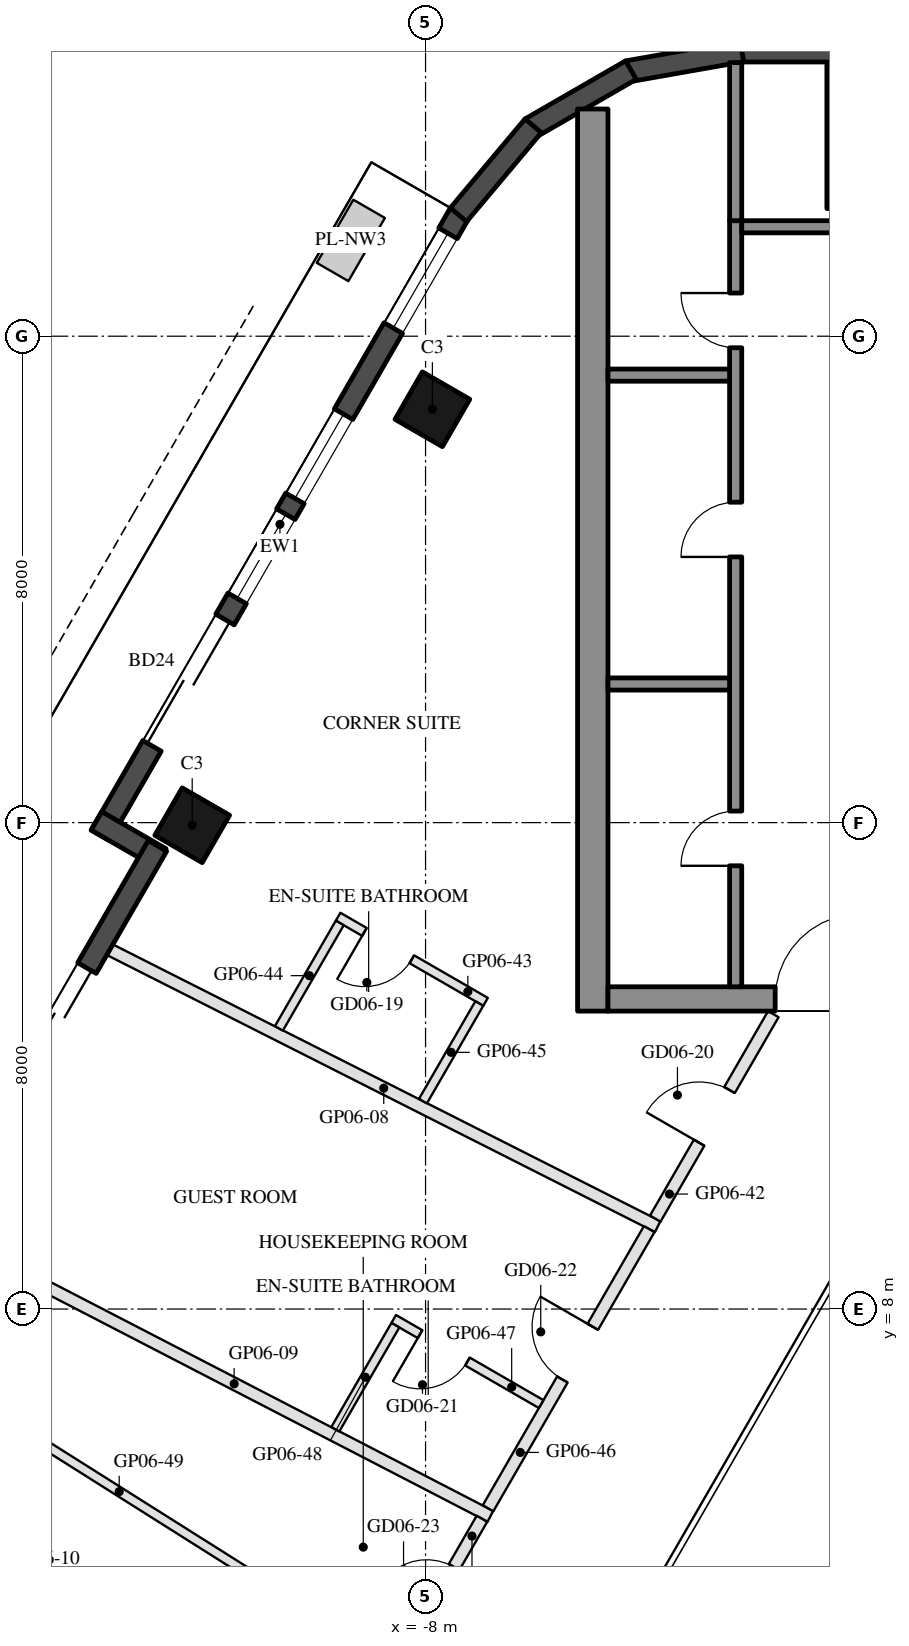
"""IFC4 building model, lengths in metres.
Left out: names, types, materials, properties, quantities, classifications, styles, units other than length and angle.
Written with IfcOpenShell. Run it as: python <this file> out.ifc"""

import sys

from ifc_helpers import new_model, si_unit, direction, frame, frame_2d, origin, origin_2d, place, context, subcontext, project, spatial, rectangle, hollow_rectangle, extrude, element, fill, save


model = new_model("IFC4")
c1 = context("Model", 3, precision=1e-05, world=origin(), true_north=direction((0.0, 1.0)))
c2 = subcontext(c1, "Body", "Model", "MODEL_VIEW")
j1 = project(units=[si_unit("LENGTHUNIT", "METRE"), si_unit("PLANEANGLEUNIT", "RADIAN")], contexts=[c1])
p1 = place(None, origin())
s1 = spatial("IfcSite", under=j1, at=p1, CompositionType="ELEMENT")
p2 = place(p1, origin())
s2 = spatial("IfcBuilding", under=s1, at=p2, CompositionType="ELEMENT")
p3 = place(p2, frame((0.0, 0.0, 90.9)))
s3 = spatial("IfcBuildingStorey", under=s2, at=p3, CompositionType="ELEMENT", Elevation=90.9)
for number, where, z_axis, x_axis in (
    (1, (-7.888, 22.798, 0.0), (0.0, 0.0, 1.0), (0.5, 0.866, 0.0)),
    (2, (-11.838, 15.957, 0.0), (0.0, 0.0, 1.0), (0.5, 0.866, 0.0)),
):
    element("IfcColumn", number, at=place(p3, frame(where, z_axis=z_axis, x_axis=x_axis)), inside=s3, PredefinedType="COLUMN", context=c2, shape_type="SweptSolid", body=[
        extrude(hollow_rectangle(XDim=0.9, YDim=0.9, WallThickness=0.04, at=origin_2d()), origin(), (0.0, 0.0, 1.0), 3.7),
    ])
p4 = place(p3, frame((0.0, 27.3, 0.0), z_axis=(0.0, 0.0, 1.0), x_axis=(1.0, 0.0, 0.0)))
e3 = element("IfcColumn", 3, at=p4, inside=s3, PredefinedType="COLUMN", context=c2, shape_type="SweptSolid", body=[
    extrude(hollow_rectangle(XDim=2.8, YDim=2.4, WallThickness=0.07, at=origin_2d()), origin(), (0.0, 0.0, 1.0), 3.7),
])
p5 = place(p3, frame((-7.441, 26.022, 0.0), z_axis=(0.0, 0.0, 1.0), x_axis=(-0.499992533062, -0.86602971478, 0.0)))
e4 = element("IfcWall", 4, at=p5, inside=s3, PredefinedType="SOLIDWALL", context=c2, shape_type="SweptSolid", body=[
    extrude(rectangle(XDim=11.816, YDim=0.35, at=frame_2d((5.908, 0.0))), origin(), (0.0, 0.0, 1.0), 3.55),
])
p6 = place(p5, frame((0.381, 0.0, 0.3)))
e5 = element("IfcOpeningElement", 5, at=p6, cuts=e4, PredefinedType="OPENING", context=c2, shape_type="SweptSolid", body=[
    extrude(rectangle(XDim=1.8, YDim=2.65, at=frame_2d((0.9, 1.325))), frame((0.0, 0.185, 0.0), z_axis=(0.0, -1.0, 0.0), x_axis=(1.0, 0.0, 0.0)), (0.0, 0.0, 1.0), 0.37),
])
p7 = place(p5, frame((7.716, 0.0, 0.0)))
e6 = element("IfcOpeningElement", 6, at=p7, cuts=e4, PredefinedType="OPENING", context=c2, shape_type="SweptSolid", body=[
    extrude(rectangle(XDim=2.4, YDim=2.4, at=frame_2d((1.2, 1.2))), frame((0.0, 0.185, 0.0), z_axis=(0.0, -1.0, 0.0), x_axis=(1.0, 0.0, 0.0)), (0.0, 0.0, 1.0), 0.37),
])
p8 = place(p5, frame((3.815, 0.0, 0.3)))
e7 = element("IfcOpeningElement", 7, at=p8, cuts=e4, PredefinedType="OPENING", context=c2, shape_type="SweptSolid", body=[
    extrude(rectangle(XDim=1.6, YDim=2.65, at=frame_2d((0.8, 1.325))), frame((0.0, 0.185, 0.0), z_axis=(0.0, -1.0, 0.0), x_axis=(1.0, 0.0, 0.0)), (0.0, 0.0, 1.0), 0.37),
])
p9 = place(p5, frame((5.715, 0.0, 0.3)))
e8 = element("IfcOpeningElement", 8, at=p9, cuts=e4, PredefinedType="OPENING", context=c2, shape_type="SweptSolid", body=[
    extrude(rectangle(XDim=1.6, YDim=2.65, at=frame_2d((0.8, 1.325))), frame((0.0, 0.185, 0.0), z_axis=(0.0, -1.0, 0.0), x_axis=(1.0, 0.0, 0.0)), (0.0, 0.0, 1.0), 0.37),
])
p10 = place(p3, frame((-13.413, 16.029, 0.0), z_axis=(0.0, 0.0, 1.0), x_axis=(0.866005645448, -0.500034220881, 0.0)))
e9 = element("IfcWall", 9, at=p10, inside=s3, PredefinedType="SOLIDWALL", context=c2, shape_type="SweptSolid", body=[
    extrude(rectangle(XDim=1.22, YDim=0.35, at=frame_2d((0.61, 0.0))), origin(), (0.0, 0.0, 1.0), 3.55),
])
p11 = place(p3, frame((-12.409, 15.617, 0.0), z_axis=(0.0, 0.0, 1.0), x_axis=(-0.500003597184, -0.866023326939, 0.0)))
e10 = element("IfcWall", 10, at=p11, inside=s3, PredefinedType="SOLIDWALL", context=c2, shape_type="SweptSolid", body=[
    extrude(rectangle(XDim=6.74, YDim=0.35, at=frame_2d((3.37, 0.0))), origin(), (0.0, 0.0, 1.0), 3.55),
])
p12 = place(p11, frame((2.32, 0.0, 0.0)))
e11 = element("IfcOpeningElement", 11, at=p12, cuts=e10, PredefinedType="OPENING", context=c2, shape_type="SweptSolid", body=[
    extrude(rectangle(XDim=1.8, YDim=2.4, at=frame_2d((0.9, 1.2))), frame((0.0, 0.185, 0.0), z_axis=(0.0, -1.0, 0.0), x_axis=(1.0, 0.0, 0.0)), (0.0, 0.0, 1.0), 0.37),
])
p13 = place(p11, frame((4.42, 0.0, 0.3)))
e12 = element("IfcOpeningElement", 12, at=p13, cuts=e10, PredefinedType="OPENING", context=c2, shape_type="SweptSolid", body=[
    extrude(rectangle(XDim=1.5, YDim=2.65, at=frame_2d((0.75, 1.325))), frame((0.0, 0.185, 0.0), z_axis=(0.0, -1.0, 0.0), x_axis=(1.0, 0.0, 0.0)), (0.0, 0.0, 1.0), 0.37),
])
p14 = place(p3, frame((2.829, 28.685, 0.0), z_axis=(0.0, 0.0, 1.0), x_axis=(-1.0, 0.0, 0.0)))
e13 = element("IfcWall", 13, at=p14, inside=s3, PredefinedType="SOLIDWALL", context=c2, shape_type="SweptSolid", body=[
    extrude(rectangle(XDim=5.658, YDim=0.35, at=frame_2d((2.829, 0.0))), origin(), (0.0, 0.0, 1.0), 3.55),
])
for number, where, z_axis, x_axis in (
    (14, (-2.799, 28.688, 0.0), (0.0, 0.0, 1.0), (-0.985, -0.174, 0.0)),
    (15, (-4.623, 28.377, 0.0), (0.0, 0.0, 1.0), (-0.866, -0.5, 0.0)),
):
    element("IfcWall", number, at=place(p3, frame(where, z_axis=z_axis, x_axis=x_axis)), inside=s3, PredefinedType="SOLIDWALL", context=c2, shape_type="SweptSolid", body=[
        extrude(rectangle(XDim=1.91, YDim=0.35, at=frame_2d((0.955, 0.0))), origin(), (0.0, 0.0, 1.0), 3.55),
    ])
p15 = place(p3, frame((-6.23, 27.461, 0.0), z_axis=(0.0, 0.0, 1.0), x_axis=(-0.642808304945, -0.766027077259, 0.0)))
e16 = element("IfcWall", 16, at=p15, inside=s3, PredefinedType="SOLIDWALL", context=c2, shape_type="SweptSolid", body=[
    extrude(rectangle(XDim=1.91, YDim=0.35, at=frame_2d((0.955, 0.0))), origin(), (0.0, 0.0, 1.0), 3.55),
])
p16 = place(p3, frame((-5.25, 12.9, 0.0), z_axis=(0.0, 0.0, 1.0), x_axis=(0.0, 1.0, 0.0)))
e17 = element("IfcWall", 17, at=p16, inside=s3, PredefinedType="SHEAR", context=c2, shape_type="SweptSolid", body=[
    extrude(rectangle(XDim=14.837, YDim=0.5, at=frame_2d((7.418, 0.0))), origin(), (0.0, 0.0, 1.0), 3.5),
])
p17 = place(p3, frame((5.0, 13.1, 0.0), z_axis=(0.0, 0.0, 1.0), x_axis=(-1.0, 0.0, 0.0)))
e18 = element("IfcWall", 18, at=p17, inside=s3, PredefinedType="SHEAR", context=c2, shape_type="SweptSolid", body=[
    extrude(rectangle(XDim=10.0, YDim=0.4, at=frame_2d((5.0, 0.0))), origin(), (0.0, 0.0, 1.0), 3.5),
])
p18 = place(p17, frame((3.55, 0.0, 0.0)))
e19 = element("IfcOpeningElement", 19, at=p18, cuts=e18, PredefinedType="OPENING", context=c2, shape_type="SweptSolid", body=[
    extrude(rectangle(XDim=1.1, YDim=2.1, at=frame_2d((0.55, 1.05))), frame((0.0, 0.21, 0.0), z_axis=(0.0, -1.0, 0.0), x_axis=(1.0, 0.0, 0.0)), (0.0, 0.0, 1.0), 0.42),
])
p19 = place(p17, frame((5.85, 0.0, 0.0)))
e20 = element("IfcOpeningElement", 20, at=p19, cuts=e18, PredefinedType="OPENING", context=c2, shape_type="SweptSolid", body=[
    extrude(rectangle(XDim=1.4, YDim=2.1, at=frame_2d((0.7, 1.05))), frame((0.0, 0.21, 0.0), z_axis=(0.0, -1.0, 0.0), x_axis=(1.0, 0.0, 0.0)), (0.0, 0.0, 1.0), 0.42),
])
p20 = place(p3, frame((-2.9, 13.3, 0.0), z_axis=(0.0, 0.0, 1.0), x_axis=(0.0, 1.0, 0.0)))
e21 = element("IfcWall", 21, at=p20, inside=s3, PredefinedType="SHEAR", context=c2, shape_type="SweptSolid", body=[
    extrude(rectangle(XDim=12.6, YDim=0.2, at=frame_2d((6.3, 0.0))), origin(), (0.0, 0.0, 1.0), 3.5),
])
p21 = place(p20, frame((1.99, 0.0, 0.0)))
e22 = element("IfcOpeningElement", 22, at=p21, cuts=e21, PredefinedType="OPENING", context=c2, shape_type="SweptSolid", body=[
    extrude(rectangle(XDim=0.9, YDim=2.1, at=frame_2d((0.45, 1.05))), frame((0.0, 0.11, 0.0), z_axis=(0.0, -1.0, 0.0), x_axis=(1.0, 0.0, 0.0)), (0.0, 0.0, 1.0), 0.22),
])
p22 = place(p20, frame((7.07, 0.0, 0.0)))
e23 = element("IfcOpeningElement", 23, at=p22, cuts=e21, PredefinedType="OPENING", context=c2, shape_type="SweptSolid", body=[
    extrude(rectangle(XDim=0.9, YDim=2.1, at=frame_2d((0.45, 1.05))), frame((0.0, 0.11, 0.0), z_axis=(0.0, -1.0, 0.0), x_axis=(1.0, 0.0, 0.0)), (0.0, 0.0, 1.0), 0.22),
])
p23 = place(p20, frame((10.51, 0.0, 0.0)))
e24 = element("IfcOpeningElement", 24, at=p23, cuts=e21, PredefinedType="OPENING", context=c2, shape_type="SweptSolid", body=[
    extrude(rectangle(XDim=0.9, YDim=2.1, at=frame_2d((0.45, 1.05))), frame((0.0, 0.11, 0.0), z_axis=(0.0, -1.0, 0.0), x_axis=(1.0, 0.0, 0.0)), (0.0, 0.0, 1.0), 0.22),
])
p24 = place(p3, frame((-0.4, 25.8, 0.0), z_axis=(0.0, 0.0, 1.0), x_axis=(-1.0, 0.0, 0.0)))
e25 = element("IfcWall", 25, at=p24, inside=s3, PredefinedType="SHEAR", context=c2, shape_type="SweptSolid", body=[
    extrude(rectangle(XDim=2.4, YDim=0.2, at=frame_2d((1.2, 0.0))), origin(), (0.0, 0.0, 1.0), 3.5),
])
for number, where, z_axis, x_axis in (
    (26, (-3.0, 18.28, 0.0), (0.0, 0.0, 1.0), (-1.0, 0.0, 0.0)),
    (27, (-3.0, 23.36, 0.0), (0.0, 0.0, 1.0), (-1.0, 0.0, 0.0)),
):
    element("IfcWall", number, at=place(p3, frame(where, z_axis=z_axis, x_axis=x_axis)), inside=s3, PredefinedType="SHEAR", context=c2, shape_type="SweptSolid", body=[
        extrude(rectangle(XDim=2.0, YDim=0.2, at=frame_2d((1.0, 0.0))), origin(), (0.0, 0.0, 1.0), 3.5),
    ])
p25 = place(p3, frame((-2.9, 25.9, 0.0), z_axis=(0.0, 0.0, 1.0), x_axis=(0.0, 1.0, 0.0)))
e28 = element("IfcWall", 28, at=p25, inside=s3, PredefinedType="SHEAR", context=c2, shape_type="SweptSolid", body=[
    extrude(rectangle(XDim=2.6, YDim=0.2, at=frame_2d((1.3, 0.0))), origin(), (0.0, 0.0, 1.0), 3.5),
])
p26 = place(p3, frame((-13.192, 13.91, 0.0), z_axis=(0.0, 0.0, 1.0), x_axis=(0.892469554868, -0.451107629766, 0.0)))
e29 = element("IfcWall", 29, at=p26, inside=s3, PredefinedType="PARTITIONING", context=c2, shape_type="SweptSolid", body=[
    extrude(rectangle(XDim=10.096, YDim=0.2, at=frame_2d((5.048, 0.0))), origin(), (0.0, 0.0, 1.0), 2.96),
])
p27 = place(p3, frame((-15.363, 8.95, 0.0), z_axis=(0.0, 0.0, 1.0), x_axis=(0.888262888387, -0.459335434203, 0.0)))
e30 = element("IfcWall", 30, at=p27, inside=s3, PredefinedType="PARTITIONING", context=c2, shape_type="SweptSolid", body=[
    extrude(rectangle(XDim=9.49, YDim=0.2, at=frame_2d((4.745, 0.0))), origin(), (0.0, 0.0, 1.0), 2.95),
])
p28 = place(p3, frame((-18.672, 6.219, 0.0), z_axis=(0.0, 0.0, 1.0), x_axis=(0.797182242606, -0.603738744884, 0.0)))
e31 = element("IfcWall", 31, at=p28, inside=s3, PredefinedType="PARTITIONING", context=c2, shape_type="SweptSolid", body=[
    extrude(rectangle(XDim=11.066, YDim=0.2, at=frame_2d((5.533, 0.0))), origin(), (0.0, 0.0, 1.0), 2.95),
])
p29 = place(p3, frame((-4.222, 9.488, 0.0), z_axis=(0.0, 0.0, 1.0), x_axis=(0.49998736472, 0.866032698644, 0.0)))
e32 = element("IfcWall", 32, at=p29, inside=s3, PredefinedType="PARTITIONING", context=c2, shape_type="SweptSolid", body=[
    extrude(rectangle(XDim=3.882, YDim=0.2, at=frame_2d((1.941, 0.0))), origin(), (0.0, 0.0, 1.0), 2.95),
])
p30 = place(p29, frame((1.441, 0.0, 0.0)))
e33 = element("IfcOpeningElement", 33, at=p30, cuts=e32, PredefinedType="OPENING", context=c2, shape_type="SweptSolid", body=[
    extrude(rectangle(XDim=1.0, YDim=2.1, at=frame_2d((0.5, 1.05))), frame((0.0, 0.11, 0.0), z_axis=(0.0, -1.0, 0.0), x_axis=(1.0, 0.0, 0.0)), (0.0, 0.0, 1.0), 0.22),
])
p31 = place(p3, frame((-7.013, 13.052, 0.0), z_axis=(0.0, 0.0, 1.0), x_axis=(-0.866034573852, 0.49998411664, 0.0)))
e34 = element("IfcWall", 34, at=p31, inside=s3, PredefinedType="PARTITIONING", context=c2, shape_type="SweptSolid", body=[
    extrude(rectangle(XDim=2.8, YDim=0.15, at=frame_2d((1.4, 0.0))), origin(), (0.0, 0.0, 1.0), 2.95),
])
p32 = place(p31, frame((1.4, 0.0, 0.0)))
e35 = element("IfcOpeningElement", 35, at=p32, cuts=e34, PredefinedType="OPENING", context=c2, shape_type="SweptSolid", body=[
    extrude(rectangle(XDim=0.9, YDim=2.1, at=frame_2d((0.45, 1.05))), frame((0.0, 0.085, 0.0), z_axis=(0.0, -1.0, 0.0), x_axis=(1.0, 0.0, 0.0)), (0.0, 0.0, 1.0), 0.17),
])
p33 = place(p3, frame((-9.411, 14.35, 0.0), z_axis=(0.0, 0.0, 1.0), x_axis=(-0.499982900776, -0.866035275801, 0.0)))
e36 = element("IfcWall", 36, at=p33, inside=s3, PredefinedType="PARTITIONING", context=c2, shape_type="SweptSolid", body=[
    extrude(rectangle(XDim=2.001, YDim=0.15, at=frame_2d((1.001, 0.0))), origin(), (0.0, 0.0, 1.0), 3.55),
])
p34 = place(p3, frame((-7.116, 13.025, 0.0), z_axis=(0.0, 0.0, 1.0), x_axis=(-0.4999770169, -0.866038672677, 0.0)))
e37 = element("IfcWall", 37, at=p34, inside=s3, PredefinedType="PARTITIONING", context=c2, shape_type="SweptSolid", body=[
    extrude(rectangle(XDim=1.854, YDim=0.15, at=frame_2d((0.927, 0.0))), origin(), (0.0, 0.0, 1.0), 3.55),
])
p35 = place(p3, frame((-6.972, 4.724, 0.0), z_axis=(0.0, 0.0, 1.0), x_axis=(0.499968318869, 0.866043694121, 0.0)))
e38 = element("IfcWall", 38, at=p35, inside=s3, PredefinedType="PARTITIONING", context=c2, shape_type="SweptSolid", body=[
    extrude(rectangle(XDim=5.301, YDim=0.2, at=frame_2d((2.65, 0.0))), origin(), (0.0, 0.0, 1.0), 2.95),
])
p36 = place(p35, frame((2.445, 0.0, 0.0)))
e39 = element("IfcOpeningElement", 39, at=p36, cuts=e38, PredefinedType="OPENING", context=c2, shape_type="SweptSolid", body=[
    extrude(rectangle(XDim=1.0, YDim=2.1, at=frame_2d((0.5, 1.05))), frame((0.0, 0.11, 0.0), z_axis=(0.0, -1.0, 0.0), x_axis=(1.0, 0.0, 0.0)), (0.0, 0.0, 1.0), 0.22),
])
p37 = place(p3, frame((-6.099, 6.437, 0.0), z_axis=(0.0, 0.0, 1.0), x_axis=(-0.865996816683, 0.500049511043, 0.0)))
e40 = element("IfcWall", 40, at=p37, inside=s3, PredefinedType="PARTITIONING", context=c2, shape_type="SweptSolid", body=[
    extrude(rectangle(XDim=2.8, YDim=0.15, at=frame_2d((1.4, 0.0))), origin(), (0.0, 0.0, 1.0), 3.55),
])
p38 = place(p37, frame((1.4, 0.0, 0.0)))
e41 = element("IfcOpeningElement", 41, at=p38, cuts=e40, PredefinedType="OPENING", context=c2, shape_type="SweptSolid", body=[
    extrude(rectangle(XDim=0.9, YDim=2.1, at=frame_2d((0.45, 1.05))), frame((0.0, 0.085, 0.0), z_axis=(0.0, -1.0, 0.0), x_axis=(1.0, 0.0, 0.0)), (0.0, 0.0, 1.0), 0.17),
])
p39 = place(p3, frame((-8.496, 7.734, 0.0), z_axis=(0.0, 0.0, 1.0), x_axis=(-0.500018274647, -0.866014852655, 0.0)))
e42 = element("IfcWall", 42, at=p39, inside=s3, PredefinedType="PARTITIONING", context=c2, shape_type="SweptSolid", body=[
    extrude(rectangle(XDim=1.977, YDim=0.15, at=frame_2d((0.988, 0.0))), origin(), (0.0, 0.0, 1.0), 3.55),
])
p40 = place(p3, frame((-17.685, 7.93, 0.0), z_axis=(0.0, 0.0, 1.0), x_axis=(0.845650943469, -0.5337363411, 0.0)))
e43 = element("IfcWall", 43, at=p40, inside=s3, PredefinedType="PARTITIONING", context=c2, shape_type="SweptSolid", body=[
    extrude(rectangle(XDim=10.989, YDim=0.15, at=frame_2d((5.494, 0.0))), origin(), (0.0, 0.0, 1.0), 2.96),
])
p41 = place(p3, frame((-8.439, 2.183, 0.0), z_axis=(0.0, 0.0, 1.0), x_axis=(0.500067773546, 0.865986271173, 0.0)))
e44 = element("IfcWall", 44, at=p41, inside=s3, PredefinedType="PARTITIONING", context=c2, shape_type="SweptSolid", body=[
    extrude(rectangle(XDim=2.733, YDim=0.2, at=frame_2d((1.367, 0.0))), origin(), (0.0, 0.0, 1.0), 2.95),
])
p42 = place(p41, frame((0.917, 0.0, 0.0)))
e45 = element("IfcOpeningElement", 45, at=p42, cuts=e44, PredefinedType="OPENING", context=c2, shape_type="SweptSolid", body=[
    extrude(rectangle(XDim=0.9, YDim=2.1, at=frame_2d((0.45, 1.05))), frame((0.0, 0.11, 0.0), z_axis=(0.0, -1.0, 0.0), x_axis=(1.0, 0.0, 0.0)), (0.0, 0.0, 1.0), 0.22),
])
p43 = place(p6, origin())
e46 = element("IfcWindow", 46, at=p43, inside=s3, PartitioningType="SINGLE_PANEL", PredefinedType="WINDOW", context=c2, shape_type="SweptSolid", body=[
    extrude(rectangle(XDim=1.8, YDim=2.65, at=frame_2d((0.9, 1.325))), frame((0.0, 0.03, 0.0), z_axis=(0.0, -1.0, 0.0), x_axis=(1.0, 0.0, 0.0)), (0.0, 0.0, 1.0), 0.06),
])
fill(e5, e46)
p44 = place(p7, frame((2.4, 0.0, 0.0), z_axis=(0.0, 0.0, 1.0), x_axis=(-1.0, 0.0, 0.0)))
e47 = element("IfcDoor", 47, at=p44, inside=s3, OperationType="SLIDING_TO_LEFT", PredefinedType="DOOR", context=c2, shape_type="SweptSolid", body=[
    extrude(rectangle(XDim=2.4, YDim=2.4, at=frame_2d((1.2, 1.2))), frame((0.0, 0.025, 0.0), z_axis=(0.0, -1.0, 0.0), x_axis=(1.0, 0.0, 0.0)), (0.0, 0.0, 1.0), 0.05),
])
fill(e6, e47)
p45 = place(p8, origin())
e48 = element("IfcWindow", 48, at=p45, inside=s3, PartitioningType="SINGLE_PANEL", PredefinedType="WINDOW", context=c2, shape_type="SweptSolid", body=[
    extrude(rectangle(XDim=1.6, YDim=2.65, at=frame_2d((0.8, 1.325))), frame((0.0, 0.03, 0.0), z_axis=(0.0, -1.0, 0.0), x_axis=(1.0, 0.0, 0.0)), (0.0, 0.0, 1.0), 0.06),
])
fill(e7, e48)
p46 = place(p9, origin())
e49 = element("IfcWindow", 49, at=p46, inside=s3, PartitioningType="SINGLE_PANEL", PredefinedType="WINDOW", context=c2, shape_type="SweptSolid", body=[
    extrude(rectangle(XDim=1.6, YDim=2.65, at=frame_2d((0.8, 1.325))), frame((0.0, 0.03, 0.0), z_axis=(0.0, -1.0, 0.0), x_axis=(1.0, 0.0, 0.0)), (0.0, 0.0, 1.0), 0.06),
])
fill(e8, e49)
p47 = place(p12, frame((1.8, 0.0, 0.0), z_axis=(0.0, 0.0, 1.0), x_axis=(-1.0, 0.0, 0.0)))
e50 = element("IfcDoor", 50, at=p47, inside=s3, OperationType="SLIDING_TO_LEFT", PredefinedType="DOOR", context=c2, shape_type="SweptSolid", body=[
    extrude(rectangle(XDim=1.8, YDim=2.4, at=frame_2d((0.9, 1.2))), frame((0.0, 0.025, 0.0), z_axis=(0.0, -1.0, 0.0), x_axis=(1.0, 0.0, 0.0)), (0.0, 0.0, 1.0), 0.05),
])
fill(e11, e50)
p48 = place(p21, origin())
e51 = element("IfcDoor", 51, at=p48, inside=s3, OperationType="SINGLE_SWING_LEFT", PredefinedType="DOOR", context=c2, shape_type="SweptSolid", body=[
    extrude(rectangle(XDim=0.9, YDim=2.1, at=frame_2d((0.45, 1.05))), frame((0.0, 0.025, 0.0), z_axis=(0.0, -1.0, 0.0), x_axis=(1.0, 0.0, 0.0)), (0.0, 0.0, 1.0), 0.05),
])
fill(e22, e51)
p49 = place(p22, origin())
e52 = element("IfcDoor", 52, at=p49, inside=s3, OperationType="SINGLE_SWING_LEFT", PredefinedType="DOOR", context=c2, shape_type="SweptSolid", body=[
    extrude(rectangle(XDim=0.9, YDim=2.1, at=frame_2d((0.45, 1.05))), frame((0.0, 0.025, 0.0), z_axis=(0.0, -1.0, 0.0), x_axis=(1.0, 0.0, 0.0)), (0.0, 0.0, 1.0), 0.05),
])
fill(e23, e52)
p50 = place(p23, origin())
e53 = element("IfcDoor", 53, at=p50, inside=s3, OperationType="SINGLE_SWING_RIGHT", PredefinedType="DOOR", context=c2, shape_type="SweptSolid", body=[
    extrude(rectangle(XDim=0.9, YDim=2.1, at=frame_2d((0.45, 1.05))), frame((0.0, 0.025, 0.0), z_axis=(0.0, -1.0, 0.0), x_axis=(1.0, 0.0, 0.0)), (0.0, 0.0, 1.0), 0.05),
])
fill(e24, e53)
p51 = place(p19, frame((1.4, 0.0, 0.0), z_axis=(0.0, 0.0, 1.0), x_axis=(-1.0, 0.0, 0.0)))
e54 = element("IfcDoor", 54, at=p51, inside=s3, OperationType="DOUBLE_DOOR_SINGLE_SWING", PredefinedType="DOOR", context=c2, shape_type="SweptSolid", body=[
    extrude(rectangle(XDim=1.4, YDim=2.1, at=frame_2d((0.7, 1.05))), frame((0.0, 0.025, 0.0), z_axis=(0.0, -1.0, 0.0), x_axis=(1.0, 0.0, 0.0)), (0.0, 0.0, 1.0), 0.05),
])
fill(e20, e54)
p52 = place(p32, origin())
e55 = element("IfcDoor", 55, at=p52, inside=s3, OperationType="SINGLE_SWING_RIGHT", PredefinedType="DOOR", context=c2, shape_type="SweptSolid", body=[
    extrude(rectangle(XDim=0.9, YDim=2.1, at=frame_2d((0.45, 1.05))), frame((0.0, 0.025, 0.0), z_axis=(0.0, -1.0, 0.0), x_axis=(1.0, 0.0, 0.0)), (0.0, 0.0, 1.0), 0.05),
])
fill(e35, e55)
p53 = place(p30, origin())
e56 = element("IfcDoor", 56, at=p53, inside=s3, OperationType="SINGLE_SWING_LEFT", PredefinedType="DOOR", context=c2, shape_type="SweptSolid", body=[
    extrude(rectangle(XDim=1.0, YDim=2.1, at=frame_2d((0.5, 1.05))), frame((0.0, 0.025, 0.0), z_axis=(0.0, -1.0, 0.0), x_axis=(1.0, 0.0, 0.0)), (0.0, 0.0, 1.0), 0.05),
])
fill(e33, e56)
p54 = place(p38, origin())
e57 = element("IfcDoor", 57, at=p54, inside=s3, OperationType="SINGLE_SWING_RIGHT", PredefinedType="DOOR", context=c2, shape_type="SweptSolid", body=[
    extrude(rectangle(XDim=0.9, YDim=2.1, at=frame_2d((0.45, 1.05))), frame((0.0, 0.025, 0.0), z_axis=(0.0, -1.0, 0.0), x_axis=(1.0, 0.0, 0.0)), (0.0, 0.0, 1.0), 0.05),
])
fill(e41, e57)
p55 = place(p36, origin())
e58 = element("IfcDoor", 58, at=p55, inside=s3, OperationType="SINGLE_SWING_RIGHT", PredefinedType="DOOR", context=c2, shape_type="SweptSolid", body=[
    extrude(rectangle(XDim=1.0, YDim=2.1, at=frame_2d((0.5, 1.05))), frame((0.0, 0.025, 0.0), z_axis=(0.0, -1.0, 0.0), x_axis=(1.0, 0.0, 0.0)), (0.0, 0.0, 1.0), 0.05),
])
fill(e39, e58)
save(model, sys.argv[1])
